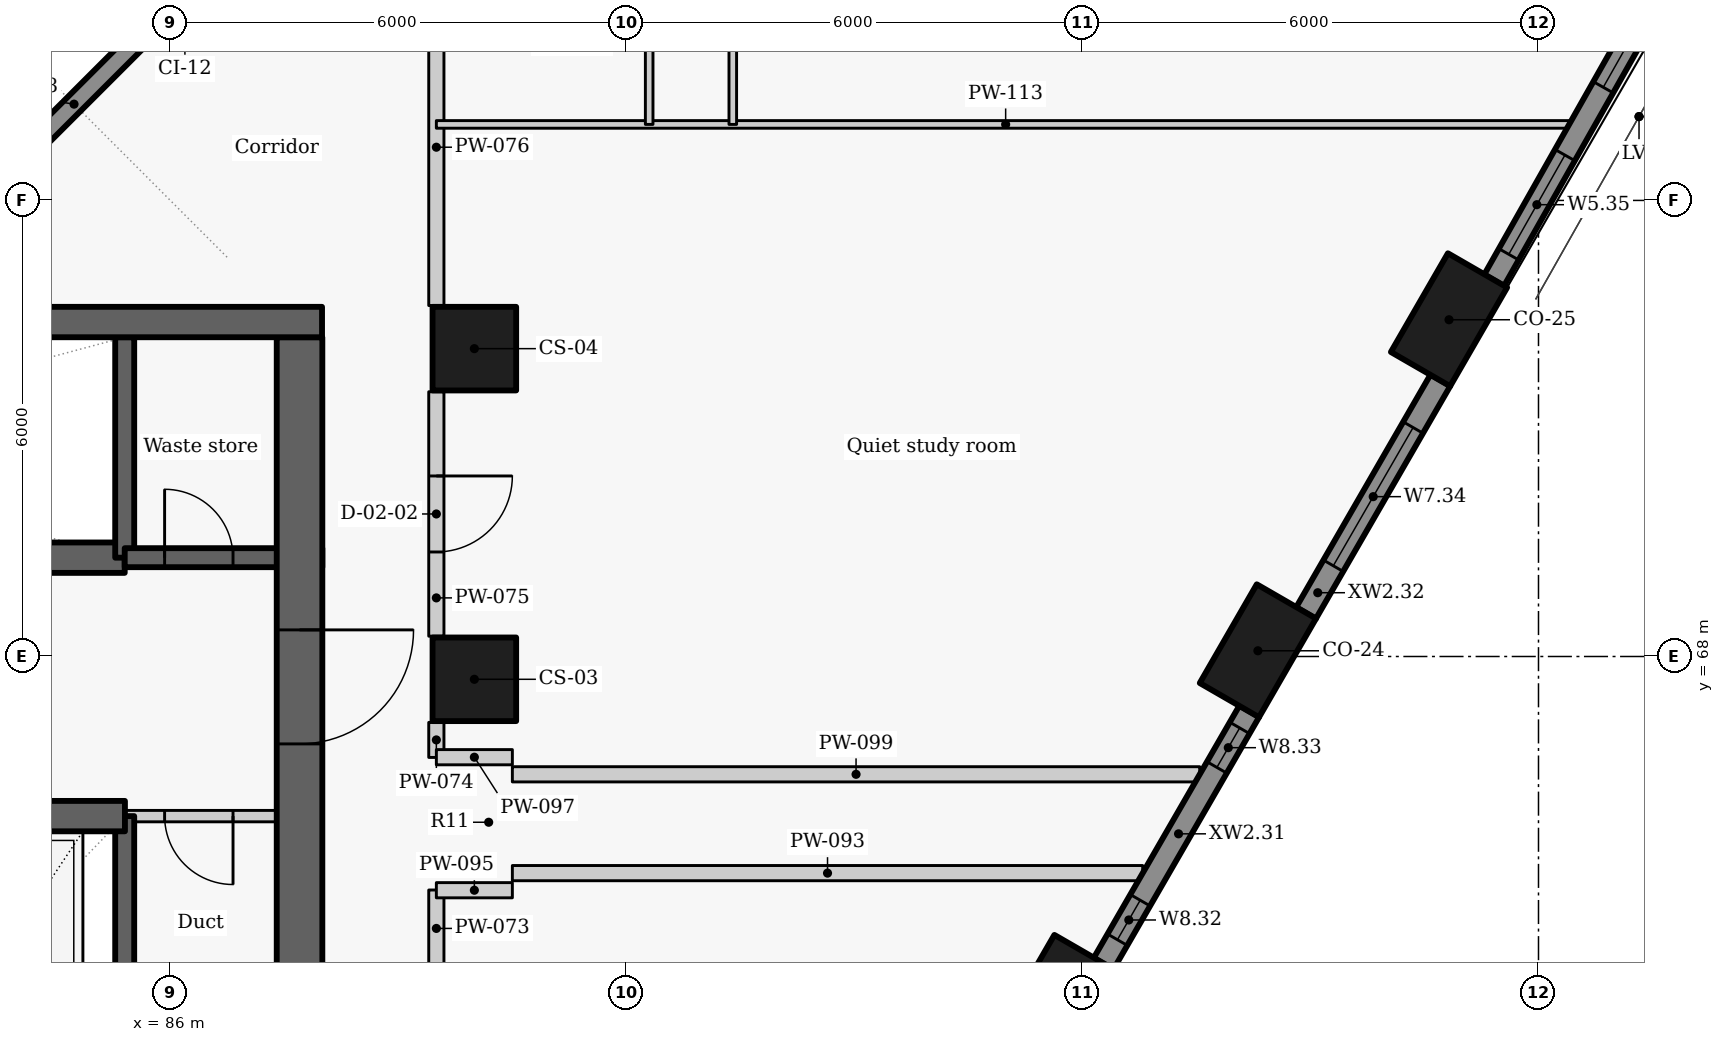
"""IFC4 building model, lengths in metres.
Left out: names, types, materials, properties, quantities, classifications, styles, units other than length and angle.
Written with IfcOpenShell. Run it as: python <this file> out.ifc"""

import sys

from ifc_helpers import new_model, si_unit, direction, frame, frame_2d, origin, origin_2d, place, context, subcontext, project, spatial, rectangle, extrude, element, fill, save


model = new_model("IFC4")
c1 = context("Model", 3, precision=1e-05, world=origin(), true_north=direction((0.0, 1.0)))
c2 = subcontext(c1, "Body", "Model", "MODEL_VIEW")
j1 = project(units=[si_unit("LENGTHUNIT", "METRE"), si_unit("PLANEANGLEUNIT", "RADIAN")], contexts=[c1])
p1 = place(None, origin())
s1 = spatial("IfcSite", under=j1, at=p1, CompositionType="ELEMENT")
p2 = place(p1, origin())
s2 = spatial("IfcBuilding", under=s1, at=p2, CompositionType="ELEMENT")
p3 = place(p2, frame((0.0, 0.0, 61.2)))
s3 = spatial("IfcBuildingStorey", under=s2, at=p3, CompositionType="ELEMENT", Elevation=61.2)
for number, where, z_axis, x_axis in (
    (1, (97.646, 63.463, 0.0), (0.0, 0.0, 1.0), (0.5, 0.866, 0.0)),
    (2, (100.308, 68.075, 0.0), (0.0, 0.0, 1.0), (0.5, 0.866, 0.0)),
    (3, (102.823, 72.43, 0.0), (0.0, 0.0, 1.0), (0.5, 0.866, 0.0)),
):
    element("IfcColumn", number, at=place(p3, frame(where, z_axis=z_axis, x_axis=x_axis)), inside=s3, PredefinedType="COLUMN", context=c2, shape_type="SweptSolid", body=[
        extrude(rectangle(XDim=1.5, YDim=0.9, at=origin_2d()), origin(), (0.0, 0.0, 1.0), 3.3),
    ])
for number, where, z_axis, x_axis in (
    (4, (90.0, 67.7, 0.0), (0.0, 0.0, 1.0), (0.0, 1.0, 0.0)),
    (5, (90.0, 72.05, 0.0), (0.0, 0.0, 1.0), (0.0, 1.0, 0.0)),
):
    element("IfcColumn", number, at=place(p3, frame(where, z_axis=z_axis, x_axis=x_axis)), inside=s3, PredefinedType="COLUMN", context=c2, shape_type="SweptSolid", body=[
        extrude(rectangle(XDim=1.1, YDim=1.1, at=origin_2d()), origin(), (0.0, 0.0, 1.0), 3.3),
    ])
p4 = place(p3, frame((98.278, 63.959, 0.0), z_axis=(0.0, 0.0, 1.0), x_axis=(0.500001735503, 0.866024401789, 0.0)))
e6 = element("IfcWall", 6, at=p4, inside=s3, PredefinedType="SOLIDWALL", context=c2, shape_type="SweptSolid", body=[
    extrude(rectangle(XDim=3.834, YDim=0.3, at=frame_2d((1.917, 0.0))), origin(), (0.0, 0.0, 1.0), 2.425),
])
p5 = place(p4, frame((0.364, 0.0, 0.9)))
e7 = element("IfcOpeningElement", 7, at=p5, cuts=e6, PredefinedType="OPENING", context=c2, shape_type="SweptSolid", body=[
    extrude(rectangle(XDim=0.6, YDim=1.1, at=frame_2d((0.3, 0.55))), frame((0.0, 0.16, 0.0), z_axis=(0.0, -1.0, 0.0), x_axis=(1.0, 0.0, 0.0)), (0.0, 0.0, 1.0), 0.32),
])
p6 = place(p4, frame((2.981, 0.0, 0.9)))
e8 = element("IfcOpeningElement", 8, at=p6, cuts=e6, PredefinedType="OPENING", context=c2, shape_type="SweptSolid", body=[
    extrude(rectangle(XDim=0.6, YDim=1.1, at=frame_2d((0.3, 0.55))), frame((0.0, 0.16, 0.0), z_axis=(0.0, -1.0, 0.0), x_axis=(1.0, 0.0, 0.0)), (0.0, 0.0, 1.0), 0.32),
])
p7 = place(p3, frame((100.941, 68.571, 0.0), z_axis=(0.0, 0.0, 1.0), x_axis=(0.499977402622, 0.866038449993, 0.0)))
e9 = element("IfcWall", 9, at=p7, inside=s3, PredefinedType="SOLIDWALL", context=c2, shape_type="SweptSolid", body=[
    extrude(rectangle(XDim=3.537, YDim=0.3, at=frame_2d((1.769, 0.0))), origin(), (0.0, 0.0, 1.0), 2.425),
])
p8 = place(p7, frame((0.719, 0.0, 0.9)))
e10 = element("IfcOpeningElement", 10, at=p8, cuts=e9, PredefinedType="OPENING", context=c2, shape_type="SweptSolid", body=[
    extrude(rectangle(XDim=2.1, YDim=1.1, at=frame_2d((1.05, 0.55))), frame((0.0, 0.16, 0.0), z_axis=(0.0, -1.0, 0.0), x_axis=(1.0, 0.0, 0.0)), (0.0, 0.0, 1.0), 0.32),
])
p9 = place(p3, frame((103.416, 72.949, 0.0), z_axis=(0.0, 0.0, 1.0), x_axis=(0.492363204642, 0.870389840655, 0.0)))
e11 = element("IfcWall", 11, at=p9, inside=s3, PredefinedType="SOLIDWALL", context=c2, shape_type="SweptSolid", body=[
    extrude(rectangle(XDim=5.626, YDim=0.3, at=frame_2d((2.813, 0.0))), origin(), (0.0, 0.0, 1.0), 2.425),
])
p10 = place(p9, frame((0.393, 0.0, 0.9)))
e12 = element("IfcOpeningElement", 12, at=p10, cuts=e11, PredefinedType="OPENING", context=c2, shape_type="SweptSolid", body=[
    extrude(rectangle(XDim=1.5, YDim=1.1, at=frame_2d((0.75, 0.55))), frame((0.0, 0.16, 0.0), z_axis=(0.0, -1.0, 0.0), x_axis=(1.0, 0.0, 0.0)), (0.0, 0.0, 1.0), 0.32),
])
p11 = place(p9, frame((2.917, 0.0, 0.9)))
e13 = element("IfcOpeningElement", 13, at=p11, cuts=e11, PredefinedType="OPENING", context=c2, shape_type="SweptSolid", body=[
    extrude(rectangle(XDim=1.5, YDim=1.1, at=frame_2d((0.75, 0.55))), frame((0.0, 0.16, 0.0), z_axis=(0.0, -1.0, 0.0), x_axis=(1.0, 0.0, 0.0)), (0.0, 0.0, 1.0), 0.32),
])
p12 = place(p3, frame((85.806, 76.339, 0.0), z_axis=(0.0, 0.0, 1.0), x_axis=(-0.707106781187, -0.707106781187, 0.0)))
e14 = element("IfcWall", 14, at=p12, inside=s3, PredefinedType="SOLIDWALL", context=c2, shape_type="SweptSolid", body=[
    extrude(rectangle(XDim=3.033, YDim=0.25, at=frame_2d((1.517, 0.0))), origin(), (0.0, 0.0, 1.0), 2.425),
])
p13 = place(p3, frame((74.6, 69.3, -0.275), z_axis=(0.0, 0.0, 1.0), x_axis=(1.0, 0.0, 0.0)))
e15 = element("IfcWall", 15, at=p13, inside=s3, PredefinedType="SHEAR", context=c2, shape_type="SweptSolid", body=[
    extrude(rectangle(XDim=10.8, YDim=0.4, at=frame_2d((5.4, 0.0))), origin(), (0.0, 0.0, 1.0), 3.3),
])
p14 = place(p13, frame((0.8, 0.0, 0.275)))
e16 = element("IfcOpeningElement", 16, at=p14, cuts=e15, PredefinedType="OPENING", context=c2, shape_type="SweptSolid", body=[
    extrude(rectangle(XDim=1.1, YDim=2.1, at=frame_2d((0.55, 1.05))), frame((0.0, 0.21, 0.0), z_axis=(0.0, -1.0, 0.0), x_axis=(1.0, 0.0, 0.0)), (0.0, 0.0, 1.0), 0.42),
])
p15 = place(p13, frame((3.5, 0.0, 0.275)))
e17 = element("IfcOpeningElement", 17, at=p15, cuts=e15, PredefinedType="OPENING", context=c2, shape_type="SweptSolid", body=[
    extrude(rectangle(XDim=1.1, YDim=2.1, at=frame_2d((0.55, 1.05))), frame((0.0, 0.21, 0.0), z_axis=(0.0, -1.0, 0.0), x_axis=(1.0, 0.0, 0.0)), (0.0, 0.0, 1.0), 0.42),
])
p16 = place(p13, frame((6.2, 0.0, 0.275)))
e18 = element("IfcOpeningElement", 18, at=p16, cuts=e15, PredefinedType="OPENING", context=c2, shape_type="SweptSolid", body=[
    extrude(rectangle(XDim=1.1, YDim=2.1, at=frame_2d((0.55, 1.05))), frame((0.0, 0.21, 0.0), z_axis=(0.0, -1.0, 0.0), x_axis=(1.0, 0.0, 0.0)), (0.0, 0.0, 1.0), 0.42),
])
p17 = place(p3, frame((85.4, 63.1, -0.275), z_axis=(0.0, 0.0, 1.0), x_axis=(0.0, 1.0, 0.0)))
e19 = element("IfcWall", 19, at=p17, inside=s3, PredefinedType="SHEAR", context=c2, shape_type="SweptSolid", body=[
    extrude(rectangle(XDim=2.8, YDim=0.25, at=frame_2d((1.4, 0.0))), origin(), (0.0, 0.0, 1.0), 3.3),
])
p18 = place(p3, frame((85.4, 69.3, -0.275), z_axis=(0.0, 0.0, 1.0), x_axis=(0.0, 1.0, 0.0)))
e20 = element("IfcWall", 20, at=p18, inside=s3, PredefinedType="SHEAR", context=c2, shape_type="SweptSolid", body=[
    extrude(rectangle(XDim=2.9, YDim=0.25, at=frame_2d((1.45, 0.0))), origin(), (0.0, 0.0, 1.0), 3.3),
])
p19 = place(p3, frame((85.4, 69.3, -0.275), z_axis=(0.0, 0.0, 1.0), x_axis=(1.0, 0.0, 0.0)))
e21 = element("IfcWall", 21, at=p19, inside=s3, PredefinedType="SHEAR", context=c2, shape_type="SweptSolid", body=[
    extrude(rectangle(XDim=2.6, YDim=0.25, at=frame_2d((1.3, 0.0))), origin(), (0.0, 0.0, 1.0), 3.3),
])
p20 = place(p19, frame((0.525, 0.0, 0.275)))
e22 = element("IfcOpeningElement", 22, at=p20, cuts=e21, PredefinedType="OPENING", context=c2, shape_type="SweptSolid", body=[
    extrude(rectangle(XDim=0.9, YDim=2.1, at=frame_2d((0.45, 1.05))), frame((0.0, 0.135, 0.0), z_axis=(0.0, -1.0, 0.0), x_axis=(1.0, 0.0, 0.0)), (0.0, 0.0, 1.0), 0.27),
])
p21 = place(p3, frame((87.7, 72.2, -0.275), z_axis=(0.0, 0.0, 1.0), x_axis=(0.0, -1.0, 0.0)))
e23 = element("IfcWall", 23, at=p21, inside=s3, PredefinedType="SHEAR", context=c2, shape_type="SweptSolid", body=[
    extrude(rectangle(XDim=15.6, YDim=0.6, at=frame_2d((7.8, 0.0))), origin(), (0.0, 0.0, 1.0), 3.3),
])
p22 = place(p21, frame((3.85, 0.0, 0.275)))
e24 = element("IfcOpeningElement", 24, at=p22, cuts=e23, PredefinedType="OPENING", context=c2, shape_type="SweptSolid", body=[
    extrude(rectangle(XDim=1.5, YDim=2.1, at=frame_2d((0.75, 1.05))), frame((0.0, 0.31, 0.0), z_axis=(0.0, -1.0, 0.0), x_axis=(1.0, 0.0, 0.0)), (0.0, 0.0, 1.0), 0.62),
])
p23 = place(p21, frame((11.8, 0.0, 0.275)))
e25 = element("IfcOpeningElement", 25, at=p23, cuts=e23, PredefinedType="OPENING", context=c2, shape_type="SweptSolid", body=[
    extrude(rectangle(XDim=1.1, YDim=2.1, at=frame_2d((0.55, 1.05))), frame((0.0, 0.31, 0.0), z_axis=(0.0, -1.0, 0.0), x_axis=(1.0, 0.0, 0.0)), (0.0, 0.0, 1.0), 0.62),
])
p24 = place(p3, frame((88.0, 65.9, 0.0), z_axis=(0.0, 0.0, 1.0), x_axis=(-1.0, 0.0, 0.0)))
e26 = element("IfcWall", 26, at=p24, inside=s3, PredefinedType="PARTITIONING", context=c2, shape_type="SweptSolid", body=[
    extrude(rectangle(XDim=2.603, YDim=0.15, at=frame_2d((1.302, 0.0))), origin(), (0.0, 0.0, 1.0), 3.025),
])
p25 = place(p24, frame((1.175, 0.0, 0.0)))
e27 = element("IfcOpeningElement", 27, at=p25, cuts=e26, PredefinedType="OPENING", context=c2, shape_type="SweptSolid", body=[
    extrude(rectangle(XDim=0.9, YDim=2.1, at=frame_2d((0.45, 1.05))), frame((0.0, 0.085, 0.0), z_axis=(0.0, -1.0, 0.0), x_axis=(1.0, 0.0, 0.0)), (0.0, 0.0, 1.0), 0.17),
])
p26 = place(p3, frame((82.697, 65.9, -0.275), z_axis=(0.0, 0.0, 1.0), x_axis=(1.0, 0.0, 0.0)))
e28 = element("IfcWall", 28, at=p26, inside=s3, PredefinedType="SHEAR", context=c2, shape_type="SweptSolid", body=[
    extrude(rectangle(XDim=2.706, YDim=0.4, at=frame_2d((1.353, 0.0))), origin(), (0.0, 0.0, 1.0), 3.3),
])
p27 = place(p3, frame((89.5, 63.917, 0.0), z_axis=(0.0, 0.0, 1.0), x_axis=(0.0, 1.0, 0.0)))
e29 = element("IfcWall", 29, at=p27, inside=s3, PredefinedType="PARTITIONING", context=c2, shape_type="SweptSolid", body=[
    extrude(rectangle(XDim=1.011, YDim=0.2, at=frame_2d((0.505, 0.0))), origin(), (0.0, 0.0, 1.0), 3.025),
])
p28 = place(p3, frame((89.5, 66.672, 0.0), z_axis=(0.0, 0.0, 1.0), x_axis=(0.0, 1.0, 0.0)))
e30 = element("IfcWall", 30, at=p28, inside=s3, PredefinedType="PARTITIONING", context=c2, shape_type="SweptSolid", body=[
    extrude(rectangle(XDim=0.461, YDim=0.2, at=frame_2d((0.23, 0.0))), origin(), (0.0, 0.0, 1.0), 3.025),
])
p29 = place(p3, frame((89.5, 71.483, 0.0), z_axis=(0.0, 0.0, 1.0), x_axis=(0.0, -1.0, 0.0)))
e31 = element("IfcWall", 31, at=p29, inside=s3, PredefinedType="PARTITIONING", context=c2, shape_type="SweptSolid", body=[
    extrude(rectangle(XDim=3.216, YDim=0.2, at=frame_2d((1.608, 0.0))), origin(), (0.0, 0.0, 1.0), 3.025),
])
p30 = place(p29, frame((1.108, 0.0, 0.0)))
e32 = element("IfcOpeningElement", 32, at=p30, cuts=e31, PredefinedType="OPENING", context=c2, shape_type="SweptSolid", body=[
    extrude(rectangle(XDim=1.0, YDim=2.1, at=frame_2d((0.5, 1.05))), frame((0.0, 0.11, 0.0), z_axis=(0.0, -1.0, 0.0), x_axis=(1.0, 0.0, 0.0)), (0.0, 0.0, 1.0), 0.22),
])
p31 = place(p3, frame((89.5, 72.617, 0.0), z_axis=(0.0, 0.0, 1.0), x_axis=(0.0, 1.0, 0.0)))
e33 = element("IfcWall", 33, at=p31, inside=s3, PredefinedType="PARTITIONING", context=c2, shape_type="SweptSolid", body=[
    extrude(rectangle(XDim=4.166, YDim=0.2, at=frame_2d((2.083, 0.0))), origin(), (0.0, 0.0, 1.0), 3.025),
])
p32 = place(p3, frame((90.5, 65.15, 0.0), z_axis=(0.0, 0.0, 1.0), x_axis=(1.0, 0.0, 0.0)))
e34 = element("IfcWall", 34, at=p32, inside=s3, PredefinedType="PARTITIONING", context=c2, shape_type="SweptSolid", body=[
    extrude(rectangle(XDim=8.293, YDim=0.2, at=frame_2d((4.146, 0.0))), origin(), (0.0, 0.0, 1.0), 2.405),
])
for number, where, z_axis, x_axis in (
    (35, (89.5, 64.925, 0.0), (0.0, 0.0, 1.0), (1.0, 0.0, 0.0)),
    (36, (89.5, 66.675, 0.0), (0.0, 0.0, 1.0), (1.0, 0.0, 0.0)),
):
    element("IfcWall", number, at=place(p3, frame(where, z_axis=z_axis, x_axis=x_axis)), inside=s3, PredefinedType="PARTITIONING", context=c2, shape_type="SweptSolid", body=[
        extrude(rectangle(XDim=1.0, YDim=0.2, at=frame_2d((0.5, 0.0))), origin(), (0.0, 0.0, 1.0), 2.505),
    ])
p33 = place(p3, frame((90.5, 66.45, 0.0), z_axis=(0.0, 0.0, 1.0), x_axis=(1.0, 0.0, 0.0)))
e37 = element("IfcWall", 37, at=p33, inside=s3, PredefinedType="PARTITIONING", context=c2, shape_type="SweptSolid", body=[
    extrude(rectangle(XDim=9.043, YDim=0.2, at=frame_2d((4.521, 0.0))), origin(), (0.0, 0.0, 1.0), 2.405),
])
p34 = place(p3, frame((89.5, 75.0, 0.0), z_axis=(0.0, 0.0, 1.0), x_axis=(1.0, 0.0, 0.0)))
e38 = element("IfcWall", 38, at=p34, inside=s3, PredefinedType="PARTITIONING", context=c2, shape_type="SweptSolid", body=[
    extrude(rectangle(XDim=14.979, YDim=0.1, at=frame_2d((7.49, 0.0))), origin(), (0.0, 0.0, 1.0), 2.405),
])
p35 = place(p3, frame((92.3, 75.0, 0.0), z_axis=(0.0, 0.0, 1.0), x_axis=(0.0, 1.0, 0.0)))
e39 = element("IfcWall", 39, at=p35, inside=s3, PredefinedType="PARTITIONING", context=c2, shape_type="SweptSolid", body=[
    extrude(rectangle(XDim=8.4, YDim=0.1, at=frame_2d((4.2, 0.0))), origin(), (0.0, 0.0, 1.0), 3.025),
])
p36 = place(p35, frame((1.841, 0.0, 0.0)))
e40 = element("IfcOpeningElement", 40, at=p36, cuts=e39, PredefinedType="OPENING", context=c2, shape_type="SweptSolid", body=[
    extrude(rectangle(XDim=0.9, YDim=2.1, at=frame_2d((0.45, 1.05))), frame((0.0, 0.06, 0.0), z_axis=(0.0, -1.0, 0.0), x_axis=(1.0, 0.0, 0.0)), (0.0, 0.0, 1.0), 0.12),
])
p37 = place(p35, frame((6.066, 0.0, 0.0)))
e41 = element("IfcOpeningElement", 41, at=p37, cuts=e39, PredefinedType="OPENING", context=c2, shape_type="SweptSolid", body=[
    extrude(rectangle(XDim=0.85, YDim=2.1, at=frame_2d((0.425, 1.05))), frame((0.0, 0.06, 0.0), z_axis=(0.0, -1.0, 0.0), x_axis=(1.0, 0.0, 0.0)), (0.0, 0.0, 1.0), 0.12),
])
p38 = place(p3, frame((93.4, 94.25, 0.0), z_axis=(0.0, 0.0, 1.0), x_axis=(0.0, -1.0, 0.0)))
e42 = element("IfcWall", 42, at=p38, inside=s3, PredefinedType="PARTITIONING", context=c2, shape_type="SweptSolid", body=[
    extrude(rectangle(XDim=19.25, YDim=0.1, at=frame_2d((9.625, 0.0))), origin(), (0.0, 0.0, 1.0), 3.025),
])
p39 = place(p38, frame((17.348, 0.0, 0.0)))
e43 = element("IfcOpeningElement", 43, at=p39, cuts=e42, PredefinedType="OPENING", context=c2, shape_type="SweptSolid", body=[
    extrude(rectangle(XDim=0.9, YDim=2.1, at=frame_2d((0.45, 1.05))), frame((0.0, 0.06, 0.0), z_axis=(0.0, -1.0, 0.0), x_axis=(1.0, 0.0, 0.0)), (0.0, 0.0, 1.0), 0.12),
])
p40 = place(p38, frame((14.445, 0.0, 0.0)))
e44 = element("IfcOpeningElement", 44, at=p40, cuts=e42, PredefinedType="OPENING", context=c2, shape_type="SweptSolid", body=[
    extrude(rectangle(XDim=0.9, YDim=2.1, at=frame_2d((0.45, 1.05))), frame((0.0, 0.06, 0.0), z_axis=(0.0, -1.0, 0.0), x_axis=(1.0, 0.0, 0.0)), (0.0, 0.0, 1.0), 0.12),
])
p41 = place(p38, frame((10.897, 0.0, 0.0)))
e45 = element("IfcOpeningElement", 45, at=p41, cuts=e42, PredefinedType="OPENING", context=c2, shape_type="SweptSolid", body=[
    extrude(rectangle(XDim=0.9, YDim=2.1, at=frame_2d((0.45, 1.05))), frame((0.0, 0.06, 0.0), z_axis=(0.0, -1.0, 0.0), x_axis=(1.0, 0.0, 0.0)), (0.0, 0.0, 1.0), 0.12),
])
p42 = place(p38, frame((7.4, 0.0, 0.0)))
e46 = element("IfcOpeningElement", 46, at=p42, cuts=e42, PredefinedType="OPENING", context=c2, shape_type="SweptSolid", body=[
    extrude(rectangle(XDim=0.9, YDim=2.1, at=frame_2d((0.45, 1.05))), frame((0.0, 0.06, 0.0), z_axis=(0.0, -1.0, 0.0), x_axis=(1.0, 0.0, 0.0)), (0.0, 0.0, 1.0), 0.12),
])
p43 = place(p38, frame((4.6, 0.0, 0.0)))
e47 = element("IfcOpeningElement", 47, at=p43, cuts=e42, PredefinedType="OPENING", context=c2, shape_type="SweptSolid", body=[
    extrude(rectangle(XDim=0.9, YDim=2.1, at=frame_2d((0.45, 1.05))), frame((0.0, 0.06, 0.0), z_axis=(0.0, -1.0, 0.0), x_axis=(1.0, 0.0, 0.0)), (0.0, 0.0, 1.0), 0.12),
])
p44 = place(p38, frame((1.375, 0.0, 0.0)))
e48 = element("IfcOpeningElement", 48, at=p44, cuts=e42, PredefinedType="OPENING", context=c2, shape_type="SweptSolid", body=[
    extrude(rectangle(XDim=0.9, YDim=2.1, at=frame_2d((0.45, 1.05))), frame((0.0, 0.06, 0.0), z_axis=(0.0, -1.0, 0.0), x_axis=(1.0, 0.0, 0.0)), (0.0, 0.0, 1.0), 0.12),
])
p45 = place(p3, frame((72.004, 72.4, -0.275), z_axis=(0.0, 0.0, 1.0), x_axis=(1.0, 0.0, 0.0)))
e49 = element("IfcWall", 49, at=p45, inside=s3, PredefinedType="SHEAR", context=c2, shape_type="SweptSolid", body=[
    extrude(rectangle(XDim=15.992, YDim=0.4, at=frame_2d((7.996, 0.0))), origin(), (0.0, 0.0, 1.0), 3.3),
])
p46 = place(p5, origin())
e50 = element("IfcWindow", 50, at=p46, inside=s3, PartitioningType="SINGLE_PANEL", PredefinedType="WINDOW", context=c2, shape_type="SweptSolid", body=[
    extrude(rectangle(XDim=0.6, YDim=1.1, at=frame_2d((0.3, 0.55))), frame((0.0, 0.03, 0.0), z_axis=(0.0, -1.0, 0.0), x_axis=(1.0, 0.0, 0.0)), (0.0, 0.0, 1.0), 0.06),
])
fill(e7, e50)
p47 = place(p6, origin())
e51 = element("IfcWindow", 51, at=p47, inside=s3, PartitioningType="SINGLE_PANEL", PredefinedType="WINDOW", context=c2, shape_type="SweptSolid", body=[
    extrude(rectangle(XDim=0.6, YDim=1.1, at=frame_2d((0.3, 0.55))), frame((0.0, 0.03, 0.0), z_axis=(0.0, -1.0, 0.0), x_axis=(1.0, 0.0, 0.0)), (0.0, 0.0, 1.0), 0.06),
])
fill(e8, e51)
p48 = place(p8, origin())
e52 = element("IfcWindow", 52, at=p48, inside=s3, PartitioningType="SINGLE_PANEL", PredefinedType="WINDOW", context=c2, shape_type="SweptSolid", body=[
    extrude(rectangle(XDim=2.1, YDim=1.1, at=frame_2d((1.05, 0.55))), frame((0.0, 0.03, 0.0), z_axis=(0.0, -1.0, 0.0), x_axis=(1.0, 0.0, 0.0)), (0.0, 0.0, 1.0), 0.06),
])
fill(e10, e52)
p49 = place(p10, origin())
e53 = element("IfcWindow", 53, at=p49, inside=s3, PartitioningType="SINGLE_PANEL", PredefinedType="WINDOW", context=c2, shape_type="SweptSolid", body=[
    extrude(rectangle(XDim=1.5, YDim=1.1, at=frame_2d((0.75, 0.55))), frame((0.0, 0.03, 0.0), z_axis=(0.0, -1.0, 0.0), x_axis=(1.0, 0.0, 0.0)), (0.0, 0.0, 1.0), 0.06),
])
fill(e12, e53)
p50 = place(p11, origin())
e54 = element("IfcWindow", 54, at=p50, inside=s3, PartitioningType="SINGLE_PANEL", PredefinedType="WINDOW", context=c2, shape_type="SweptSolid", body=[
    extrude(rectangle(XDim=1.5, YDim=1.1, at=frame_2d((0.75, 0.55))), frame((0.0, 0.03, 0.0), z_axis=(0.0, -1.0, 0.0), x_axis=(1.0, 0.0, 0.0)), (0.0, 0.0, 1.0), 0.06),
])
fill(e13, e54)
p51 = place(p20, origin())
e55 = element("IfcDoor", 55, at=p51, inside=s3, OperationType="SINGLE_SWING_LEFT", PredefinedType="DOOR", context=c2, shape_type="SweptSolid", body=[
    extrude(rectangle(XDim=0.9, YDim=2.1, at=frame_2d((0.45, 1.05))), frame((0.0, 0.025, 0.0), z_axis=(0.0, -1.0, 0.0), x_axis=(1.0, 0.0, 0.0)), (0.0, 0.0, 1.0), 0.05),
])
fill(e22, e55)
p52 = place(p25, origin())
e56 = element("IfcDoor", 56, at=p52, inside=s3, OperationType="SINGLE_SWING_LEFT", PredefinedType="DOOR", context=c2, shape_type="SweptSolid", body=[
    extrude(rectangle(XDim=0.9, YDim=2.1, at=frame_2d((0.45, 1.05))), frame((0.0, 0.025, 0.0), z_axis=(0.0, -1.0, 0.0), x_axis=(1.0, 0.0, 0.0)), (0.0, 0.0, 1.0), 0.05),
])
fill(e27, e56)
p53 = place(p30, origin())
e57 = element("IfcDoor", 57, at=p53, inside=s3, OperationType="SINGLE_SWING_LEFT", PredefinedType="DOOR", context=c2, shape_type="SweptSolid", body=[
    extrude(rectangle(XDim=1.0, YDim=2.1, at=frame_2d((0.5, 1.05))), frame((0.0, 0.025, 0.0), z_axis=(0.0, -1.0, 0.0), x_axis=(1.0, 0.0, 0.0)), (0.0, 0.0, 1.0), 0.05),
])
fill(e32, e57)
p54 = place(p22, origin())
e58 = element("IfcDoor", 58, at=p54, inside=s3, OperationType="DOUBLE_DOOR_SINGLE_SWING", PredefinedType="DOOR", context=c2, shape_type="SweptSolid", body=[
    extrude(rectangle(XDim=1.5, YDim=2.1, at=frame_2d((0.75, 1.05))), frame((0.0, 0.025, 0.0), z_axis=(0.0, -1.0, 0.0), x_axis=(1.0, 0.0, 0.0)), (0.0, 0.0, 1.0), 0.05),
])
fill(e24, e58)
save(model, sys.argv[1])
